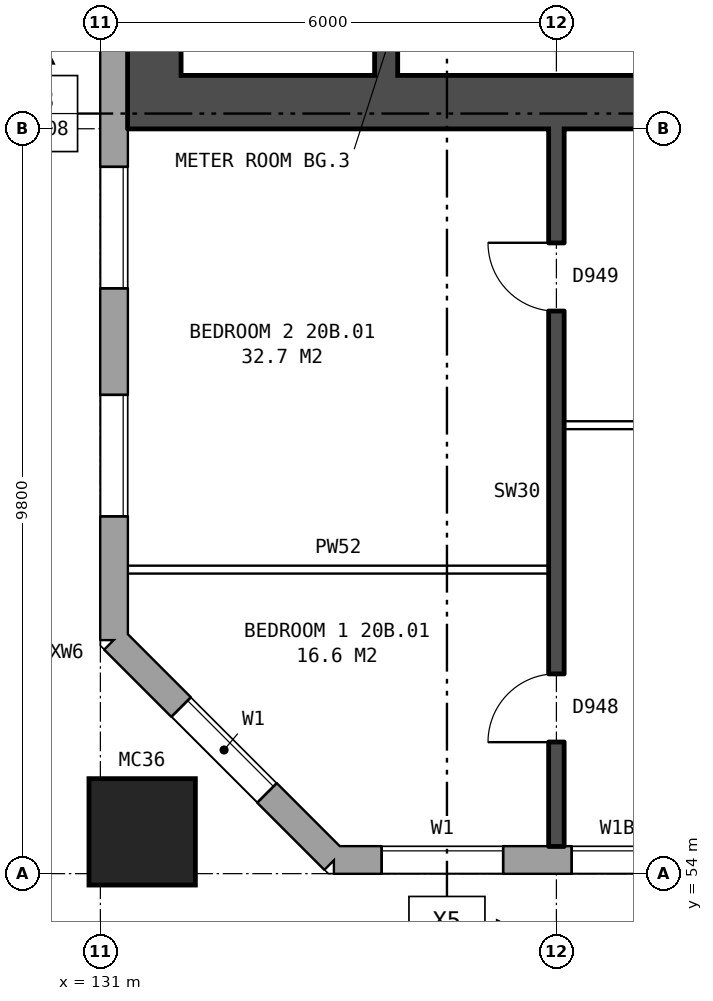
"""IFC4 building model, lengths in metres.
Left out: names, types, materials, properties, quantities, classifications, styles, units other than length and angle.
Written with IfcOpenShell. Run it as: python <this file> out.ifc"""

import sys

from ifc_helpers import new_model, si_unit, direction, frame, frame_2d, origin, origin_2d, place, context, subcontext, project, spatial, rectangle, hollow_rectangle, extrude, element, fill, save


model = new_model("IFC4")
c1 = context("Model", 3, precision=1e-05, world=origin(), true_north=direction((0.0, 1.0)))
c2 = subcontext(c1, "Body", "Model", "MODEL_VIEW")
j1 = project(units=[si_unit("LENGTHUNIT", "METRE"), si_unit("PLANEANGLEUNIT", "RADIAN")], contexts=[c1])
p1 = place(None, origin())
s1 = spatial("IfcSite", under=j1, at=p1, CompositionType="ELEMENT")
p2 = place(p1, origin())
s2 = spatial("IfcBuilding", under=s1, at=p2, CompositionType="ELEMENT")
p3 = place(p2, frame((0.0, 0.0, 74.7)))
s3 = spatial("IfcBuildingStorey", under=s2, at=p3, CompositionType="ELEMENT", Elevation=74.7)
p4 = place(p3, frame((131.55, 54.55, 0.0), z_axis=(0.0, 0.0, 1.0), x_axis=(1.0, 0.0, 0.0)))
e1 = element("IfcColumn", 1, at=p4, inside=s3, PredefinedType="COLUMN", context=c2, shape_type="SweptSolid", body=[
    extrude(hollow_rectangle(XDim=1.4, YDim=1.4, WallThickness=0.075, at=origin_2d()), origin(), (0.0, 0.0, 1.0), 3.1),
])
p5 = place(p3, frame((131.18, 57.075, 0.0), z_axis=(0.0, 0.0, 1.0), x_axis=(0.707106781187, -0.707106781187, 0.0)))
e2 = element("IfcWall", 2, at=p5, inside=s3, PredefinedType="STANDARD", context=c2, shape_type="SweptSolid", body=[
    extrude(rectangle(XDim=4.094, YDim=0.36, at=frame_2d((2.047, 0.0))), origin(), (0.0, 0.0, 1.0), 2.85),
])
p6 = place(p5, frame((1.247, 0.0, 0.8)))
e3 = element("IfcOpeningElement", 3, at=p6, cuts=e2, PredefinedType="OPENING", context=c2, shape_type="SweptSolid", body=[
    extrude(rectangle(XDim=1.6, YDim=1.8, at=frame_2d((0.8, 0.9))), frame((0.0, 0.19, 0.0), z_axis=(0.0, -1.0, 0.0), x_axis=(1.0, 0.0, 0.0)), (0.0, 0.0, 1.0), 0.38),
])
p7 = place(p3, frame((134.075, 54.18, 0.0), z_axis=(0.0, 0.0, 1.0), x_axis=(1.0, 0.0, 0.0)))
e4 = element("IfcWall", 4, at=p7, inside=s3, PredefinedType="STANDARD", context=c2, shape_type="SweptSolid", body=[
    extrude(rectangle(XDim=38.101, YDim=0.36, at=frame_2d((19.05, 0.0))), origin(), (0.0, 0.0, 1.0), 2.85),
])
p8 = place(p7, frame((0.625, 0.0, 0.8)))
e5 = element("IfcOpeningElement", 5, at=p8, cuts=e4, PredefinedType="OPENING", context=c2, shape_type="SweptSolid", body=[
    extrude(rectangle(XDim=1.6, YDim=1.8, at=frame_2d((0.8, 0.9))), frame((0.0, 0.19, 0.0), z_axis=(0.0, -1.0, 0.0), x_axis=(1.0, 0.0, 0.0)), (0.0, 0.0, 1.0), 0.38),
])
p9 = place(p7, frame((3.125, 0.0, 0.8)))
e6 = element("IfcOpeningElement", 6, at=p9, cuts=e4, PredefinedType="OPENING", context=c2, shape_type="SweptSolid", body=[
    extrude(rectangle(XDim=1.2, YDim=1.8, at=frame_2d((0.6, 0.9))), frame((0.0, 0.19, 0.0), z_axis=(0.0, -1.0, 0.0), x_axis=(1.0, 0.0, 0.0)), (0.0, 0.0, 1.0), 0.38),
])
p10 = place(p7, frame((4.625, 0.0, 1.6)))
e7 = element("IfcOpeningElement", 7, at=p10, cuts=e4, PredefinedType="OPENING", context=c2, shape_type="SweptSolid", body=[
    extrude(rectangle(XDim=0.6, YDim=0.9, at=frame_2d((0.3, 0.45))), frame((0.0, 0.19, 0.0), z_axis=(0.0, -1.0, 0.0), x_axis=(1.0, 0.0, 0.0)), (0.0, 0.0, 1.0), 0.38),
])
p11 = place(p7, frame((9.625, 0.0, 0.8)))
e8 = element("IfcOpeningElement", 8, at=p11, cuts=e4, PredefinedType="OPENING", context=c2, shape_type="SweptSolid", body=[
    extrude(rectangle(XDim=1.6, YDim=1.8, at=frame_2d((0.8, 0.9))), frame((0.0, 0.19, 0.0), z_axis=(0.0, -1.0, 0.0), x_axis=(1.0, 0.0, 0.0)), (0.0, 0.0, 1.0), 0.38),
])
p12 = place(p7, frame((12.625, 0.0, 0.8)))
e9 = element("IfcOpeningElement", 9, at=p12, cuts=e4, PredefinedType="OPENING", context=c2, shape_type="SweptSolid", body=[
    extrude(rectangle(XDim=1.6, YDim=1.8, at=frame_2d((0.8, 0.9))), frame((0.0, 0.19, 0.0), z_axis=(0.0, -1.0, 0.0), x_axis=(1.0, 0.0, 0.0)), (0.0, 0.0, 1.0), 0.38),
])
p13 = place(p7, frame((15.625, 0.0, 0.8)))
e10 = element("IfcOpeningElement", 10, at=p13, cuts=e4, PredefinedType="OPENING", context=c2, shape_type="SweptSolid", body=[
    extrude(rectangle(XDim=1.6, YDim=1.8, at=frame_2d((0.8, 0.9))), frame((0.0, 0.19, 0.0), z_axis=(0.0, -1.0, 0.0), x_axis=(1.0, 0.0, 0.0)), (0.0, 0.0, 1.0), 0.38),
])
p14 = place(p7, frame((18.625, 0.0, 0.8)))
e11 = element("IfcOpeningElement", 11, at=p14, cuts=e4, PredefinedType="OPENING", context=c2, shape_type="SweptSolid", body=[
    extrude(rectangle(XDim=1.6, YDim=1.8, at=frame_2d((0.8, 0.9))), frame((0.0, 0.19, 0.0), z_axis=(0.0, -1.0, 0.0), x_axis=(1.0, 0.0, 0.0)), (0.0, 0.0, 1.0), 0.38),
])
p15 = place(p7, frame((21.625, 0.0, 0.8)))
e12 = element("IfcOpeningElement", 12, at=p15, cuts=e4, PredefinedType="OPENING", context=c2, shape_type="SweptSolid", body=[
    extrude(rectangle(XDim=1.6, YDim=1.8, at=frame_2d((0.8, 0.9))), frame((0.0, 0.19, 0.0), z_axis=(0.0, -1.0, 0.0), x_axis=(1.0, 0.0, 0.0)), (0.0, 0.0, 1.0), 0.38),
])
p16 = place(p7, frame((24.625, 0.0, 0.8)))
e13 = element("IfcOpeningElement", 13, at=p16, cuts=e4, PredefinedType="OPENING", context=c2, shape_type="SweptSolid", body=[
    extrude(rectangle(XDim=1.6, YDim=1.8, at=frame_2d((0.8, 0.9))), frame((0.0, 0.19, 0.0), z_axis=(0.0, -1.0, 0.0), x_axis=(1.0, 0.0, 0.0)), (0.0, 0.0, 1.0), 0.38),
])
p17 = place(p7, frame((27.625, 0.0, 0.8)))
e14 = element("IfcOpeningElement", 14, at=p17, cuts=e4, PredefinedType="OPENING", context=c2, shape_type="SweptSolid", body=[
    extrude(rectangle(XDim=1.6, YDim=1.8, at=frame_2d((0.8, 0.9))), frame((0.0, 0.19, 0.0), z_axis=(0.0, -1.0, 0.0), x_axis=(1.0, 0.0, 0.0)), (0.0, 0.0, 1.0), 0.38),
])
p18 = place(p7, frame((29.525, 0.0, 0.8)))
e15 = element("IfcOpeningElement", 15, at=p18, cuts=e4, PredefinedType="OPENING", context=c2, shape_type="SweptSolid", body=[
    extrude(rectangle(XDim=1.0, YDim=1.8, at=frame_2d((0.5, 0.9))), frame((0.0, 0.19, 0.0), z_axis=(0.0, -1.0, 0.0), x_axis=(1.0, 0.0, 0.0)), (0.0, 0.0, 1.0), 0.38),
])
p19 = place(p7, frame((33.625, 0.0, 0.8)))
e16 = element("IfcOpeningElement", 16, at=p19, cuts=e4, PredefinedType="OPENING", context=c2, shape_type="SweptSolid", body=[
    extrude(rectangle(XDim=1.6, YDim=1.8, at=frame_2d((0.8, 0.9))), frame((0.0, 0.19, 0.0), z_axis=(0.0, -1.0, 0.0), x_axis=(1.0, 0.0, 0.0)), (0.0, 0.0, 1.0), 0.38),
])
p20 = place(p7, frame((6.525, 0.0, 0.8)))
e17 = element("IfcOpeningElement", 17, at=p20, cuts=e4, PredefinedType="OPENING", context=c2, shape_type="SweptSolid", body=[
    extrude(rectangle(XDim=0.6, YDim=0.9, at=frame_2d((0.3, 0.45))), frame((0.0, 0.19, 0.0), z_axis=(0.0, -1.0, 0.0), x_axis=(1.0, 0.0, 0.0)), (0.0, 0.0, 1.0), 0.38),
])
p21 = place(p7, frame((7.425, 0.0, 0.8)))
e18 = element("IfcOpeningElement", 18, at=p21, cuts=e4, PredefinedType="OPENING", context=c2, shape_type="SweptSolid", body=[
    extrude(rectangle(XDim=1.2, YDim=1.8, at=frame_2d((0.6, 0.9))), frame((0.0, 0.19, 0.0), z_axis=(0.0, -1.0, 0.0), x_axis=(1.0, 0.0, 0.0)), (0.0, 0.0, 1.0), 0.38),
])
p22 = place(p7, frame((30.825, 0.0, 0.8)))
e19 = element("IfcOpeningElement", 19, at=p22, cuts=e4, PredefinedType="OPENING", context=c2, shape_type="SweptSolid", body=[
    extrude(rectangle(XDim=0.6, YDim=0.9, at=frame_2d((0.3, 0.45))), frame((0.0, 0.19, 0.0), z_axis=(0.0, -1.0, 0.0), x_axis=(1.0, 0.0, 0.0)), (0.0, 0.0, 1.0), 0.38),
])
p23 = place(p3, frame((131.18, 82.925, 0.0), z_axis=(0.0, 0.0, 1.0), x_axis=(0.0, -1.0, 0.0)))
e20 = element("IfcWall", 20, at=p23, inside=s3, PredefinedType="STANDARD", context=c2, shape_type="SweptSolid", body=[
    extrude(rectangle(XDim=25.851, YDim=0.36, at=frame_2d((12.925, 0.0))), origin(), (0.0, 0.0, 1.0), 2.85),
])
p24 = place(p23, frame((1.625, 0.0, 0.8)))
e21 = element("IfcOpeningElement", 21, at=p24, cuts=e20, PredefinedType="OPENING", context=c2, shape_type="SweptSolid", body=[
    extrude(rectangle(XDim=1.6, YDim=1.8, at=frame_2d((0.8, 0.9))), frame((0.0, 0.19, 0.0), z_axis=(0.0, -1.0, 0.0), x_axis=(1.0, 0.0, 0.0)), (0.0, 0.0, 1.0), 0.38),
])
p25 = place(p23, frame((4.625, 0.0, 0.8)))
e22 = element("IfcOpeningElement", 22, at=p25, cuts=e20, PredefinedType="OPENING", context=c2, shape_type="SweptSolid", body=[
    extrude(rectangle(XDim=1.6, YDim=1.8, at=frame_2d((0.8, 0.9))), frame((0.0, 0.19, 0.0), z_axis=(0.0, -1.0, 0.0), x_axis=(1.0, 0.0, 0.0)), (0.0, 0.0, 1.0), 0.38),
])
p26 = place(p23, frame((19.625, 0.0, 0.8)))
e23 = element("IfcOpeningElement", 23, at=p26, cuts=e20, PredefinedType="OPENING", context=c2, shape_type="SweptSolid", body=[
    extrude(rectangle(XDim=1.6, YDim=1.8, at=frame_2d((0.8, 0.9))), frame((0.0, 0.19, 0.0), z_axis=(0.0, -1.0, 0.0), x_axis=(1.0, 0.0, 0.0)), (0.0, 0.0, 1.0), 0.38),
])
p27 = place(p23, frame((22.625, 0.0, 0.8)))
e24 = element("IfcOpeningElement", 24, at=p27, cuts=e20, PredefinedType="OPENING", context=c2, shape_type="SweptSolid", body=[
    extrude(rectangle(XDim=1.6, YDim=1.8, at=frame_2d((0.8, 0.9))), frame((0.0, 0.19, 0.0), z_axis=(0.0, -1.0, 0.0), x_axis=(1.0, 0.0, 0.0)), (0.0, 0.0, 1.0), 0.38),
])
p28 = place(p3, frame((131.71, 64.5, 0.0), z_axis=(0.0, 0.0, 1.0), x_axis=(0.0, 1.0, 0.0)))
e25 = element("IfcWall", 25, at=p28, inside=s3, PredefinedType="SHEAR", context=c2, shape_type="SweptSolid", body=[
    extrude(rectangle(XDim=11.0, YDim=0.7, at=frame_2d((5.5, 0.0))), origin(), (0.0, 0.0, 1.0), 2.85),
])
p29 = place(p3, frame((139.76, 64.15, 0.0), z_axis=(0.0, 0.0, 1.0), x_axis=(-1.0, 0.0, 0.0)))
e26 = element("IfcWall", 26, at=p29, inside=s3, PredefinedType="SHEAR", context=c2, shape_type="SweptSolid", body=[
    extrude(rectangle(XDim=8.4, YDim=0.7, at=frame_2d((4.2, 0.0))), origin(), (0.0, 0.0, 1.0), 2.85),
])
p30 = place(p3, frame((134.76, 64.5, 0.0), z_axis=(0.0, 0.0, 1.0), x_axis=(0.0, 1.0, 0.0)))
e27 = element("IfcWall", 27, at=p30, inside=s3, PredefinedType="SHEAR", context=c2, shape_type="SweptSolid", body=[
    extrude(rectangle(XDim=6.6, YDim=0.3, at=frame_2d((3.3, 0.0))), origin(), (0.0, 0.0, 1.0), 2.85),
])
p31 = place(p3, frame((131.36, 58.0, 0.0), z_axis=(0.0, 0.0, 1.0), x_axis=(1.0, 0.0, 0.0)))
e28 = element("IfcWall", 28, at=p31, inside=s3, PredefinedType="PARTITIONING", context=c2, shape_type="SweptSolid", body=[
    extrude(rectangle(XDim=5.54, YDim=0.1, at=frame_2d((2.77, 0.0))), origin(), (0.0, 0.0, 1.0), 2.85),
])
p32 = place(p3, frame((137.1, 59.9, 0.0), z_axis=(0.0, 0.0, 1.0), x_axis=(1.0, 0.0, 0.0)))
e29 = element("IfcWall", 29, at=p32, inside=s3, PredefinedType="PARTITIONING", context=c2, shape_type="SweptSolid", body=[
    extrude(rectangle(XDim=5.8, YDim=0.1, at=frame_2d((2.9, 0.0))), origin(), (0.0, 0.0, 1.0), 2.85),
])
p33 = place(p32, frame((1.3, 0.0, 0.0)))
e30 = element("IfcOpeningElement", 30, at=p33, cuts=e29, PredefinedType="OPENING", context=c2, shape_type="SweptSolid", body=[
    extrude(rectangle(XDim=0.9, YDim=2.1, at=frame_2d((0.45, 1.05))), frame((0.0, 0.06, 0.0), z_axis=(0.0, -1.0, 0.0), x_axis=(1.0, 0.0, 0.0)), (0.0, 0.0, 1.0), 0.12),
])
p34 = place(p32, frame((4.2, 0.0, 0.0)))
e31 = element("IfcOpeningElement", 31, at=p34, cuts=e29, PredefinedType="OPENING", context=c2, shape_type="SweptSolid", body=[
    extrude(rectangle(XDim=0.9, YDim=2.1, at=frame_2d((0.45, 1.05))), frame((0.0, 0.06, 0.0), z_axis=(0.0, -1.0, 0.0), x_axis=(1.0, 0.0, 0.0)), (0.0, 0.0, 1.0), 0.12),
])
p35 = place(p3, frame((137.0, 54.36, 0.0), z_axis=(0.0, 0.0, 1.0), x_axis=(0.0, 1.0, 0.0)))
e32 = element("IfcWall", 32, at=p35, inside=s3, PredefinedType="SOLIDWALL", context=c2, shape_type="SweptSolid", body=[
    extrude(rectangle(XDim=9.44, YDim=0.2, at=frame_2d((4.72, 0.0))), origin(), (0.0, 0.0, 1.0), 2.85),
])
p36 = place(p35, frame((1.37, 0.0, 0.0)))
e33 = element("IfcOpeningElement", 33, at=p36, cuts=e32, PredefinedType="OPENING", context=c2, shape_type="SweptSolid", body=[
    extrude(rectangle(XDim=0.9, YDim=2.1, at=frame_2d((0.45, 1.05))), frame((0.0, 0.11, 0.0), z_axis=(0.0, -1.0, 0.0), x_axis=(1.0, 0.0, 0.0)), (0.0, 0.0, 1.0), 0.22),
])
p37 = place(p35, frame((7.04, 0.0, 0.0)))
e34 = element("IfcOpeningElement", 34, at=p37, cuts=e32, PredefinedType="OPENING", context=c2, shape_type="SweptSolid", body=[
    extrude(rectangle(XDim=0.9, YDim=2.1, at=frame_2d((0.45, 1.05))), frame((0.0, 0.11, 0.0), z_axis=(0.0, -1.0, 0.0), x_axis=(1.0, 0.0, 0.0)), (0.0, 0.0, 1.0), 0.22),
])
p38 = place(p6, origin())
e35 = element("IfcWindow", 35, at=p38, inside=s3, PartitioningType="SINGLE_PANEL", PredefinedType="WINDOW", context=c2, shape_type="SweptSolid", body=[
    extrude(rectangle(XDim=1.6, YDim=1.8, at=frame_2d((0.8, 0.9))), frame((0.0, 0.15, 0.0), z_axis=(0.0, -1.0, 0.0), x_axis=(1.0, 0.0, 0.0)), (0.0, 0.0, 1.0), 0.06),
])
fill(e3, e35)
p39 = place(p8, origin())
e36 = element("IfcWindow", 36, at=p39, inside=s3, PartitioningType="SINGLE_PANEL", PredefinedType="WINDOW", context=c2, shape_type="SweptSolid", body=[
    extrude(rectangle(XDim=1.6, YDim=1.8, at=frame_2d((0.8, 0.9))), frame((0.0, 0.15, 0.0), z_axis=(0.0, -1.0, 0.0), x_axis=(1.0, 0.0, 0.0)), (0.0, 0.0, 1.0), 0.06),
])
fill(e5, e36)
p40 = place(p9, origin())
e37 = element("IfcWindow", 37, at=p40, inside=s3, PartitioningType="SINGLE_PANEL", PredefinedType="WINDOW", context=c2, shape_type="SweptSolid", body=[
    extrude(rectangle(XDim=1.2, YDim=1.8, at=frame_2d((0.6, 0.9))), frame((0.0, 0.15, 0.0), z_axis=(0.0, -1.0, 0.0), x_axis=(1.0, 0.0, 0.0)), (0.0, 0.0, 1.0), 0.06),
])
fill(e6, e37)
p41 = place(p26, origin())
e38 = element("IfcWindow", 38, at=p41, inside=s3, PartitioningType="SINGLE_PANEL", PredefinedType="WINDOW", context=c2, shape_type="SweptSolid", body=[
    extrude(rectangle(XDim=1.6, YDim=1.8, at=frame_2d((0.8, 0.9))), frame((0.0, 0.15, 0.0), z_axis=(0.0, -1.0, 0.0), x_axis=(1.0, 0.0, 0.0)), (0.0, 0.0, 1.0), 0.06),
])
fill(e23, e38)
p42 = place(p27, origin())
e39 = element("IfcWindow", 39, at=p42, inside=s3, PartitioningType="SINGLE_PANEL", PredefinedType="WINDOW", context=c2, shape_type="SweptSolid", body=[
    extrude(rectangle(XDim=1.6, YDim=1.8, at=frame_2d((0.8, 0.9))), frame((0.0, 0.15, 0.0), z_axis=(0.0, -1.0, 0.0), x_axis=(1.0, 0.0, 0.0)), (0.0, 0.0, 1.0), 0.06),
])
fill(e24, e39)
p43 = place(p36, origin())
e40 = element("IfcDoor", 40, at=p43, inside=s3, OperationType="SINGLE_SWING_LEFT", PredefinedType="DOOR", context=c2, shape_type="SweptSolid", body=[
    extrude(rectangle(XDim=0.9, YDim=2.1, at=frame_2d((0.45, 1.05))), frame((0.0, 0.025, 0.0), z_axis=(0.0, -1.0, 0.0), x_axis=(1.0, 0.0, 0.0)), (0.0, 0.0, 1.0), 0.05),
])
fill(e33, e40)
p44 = place(p37, origin())
e41 = element("IfcDoor", 41, at=p44, inside=s3, OperationType="SINGLE_SWING_RIGHT", PredefinedType="DOOR", context=c2, shape_type="SweptSolid", body=[
    extrude(rectangle(XDim=0.9, YDim=2.1, at=frame_2d((0.45, 1.05))), frame((0.0, 0.025, 0.0), z_axis=(0.0, -1.0, 0.0), x_axis=(1.0, 0.0, 0.0)), (0.0, 0.0, 1.0), 0.05),
])
fill(e34, e41)
save(model, sys.argv[1])
